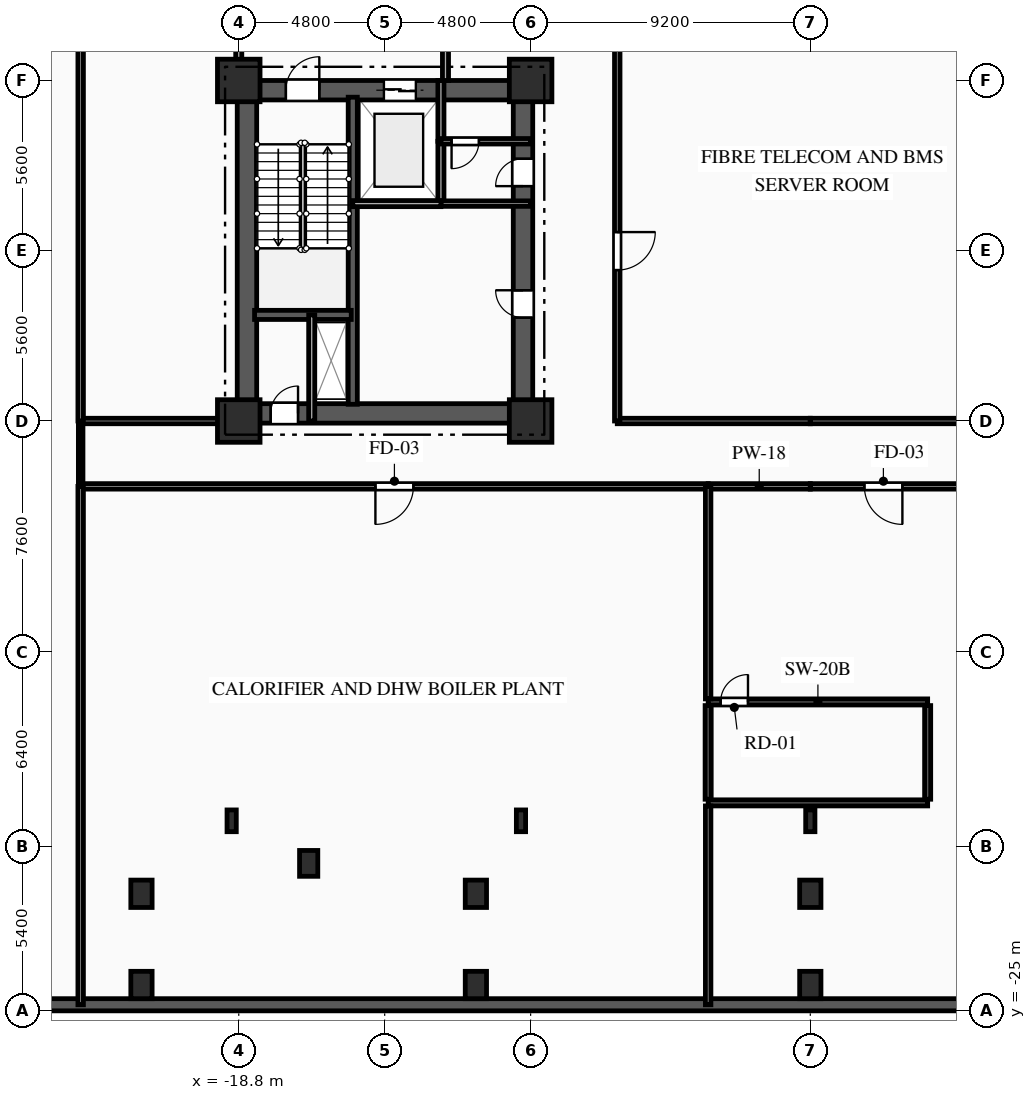
"""IFC4 building model, lengths in metres.
Left out: names, types, materials, properties, quantities, classifications, styles, units other than length and angle.
Written with IfcOpenShell. Run it as: python <this file> out.ifc"""

import sys

from ifc_helpers import new_model, si_unit, direction, frame, frame_2d, origin, origin_2d, place, context, subcontext, project, spatial, rectangle, i_section, extrude, element, fill, save


model = new_model("IFC4")
c1 = context("Model", 3, precision=1e-05, world=origin(), true_north=direction((0.0, 1.0)))
c2 = subcontext(c1, "Body", "Model", "MODEL_VIEW")
j1 = project(units=[si_unit("LENGTHUNIT", "METRE"), si_unit("PLANEANGLEUNIT", "RADIAN")], contexts=[c1])
p1 = place(None, origin())
s1 = spatial("IfcSite", under=j1, at=p1, CompositionType="ELEMENT")
p2 = place(p1, origin())
s2 = spatial("IfcBuilding", under=s1, at=p2, CompositionType="ELEMENT")
p3 = place(p2, frame((0.0, 0.0, -4.5)))
s3 = spatial("IfcBuildingStorey", under=s2, at=p3, CompositionType="ELEMENT", Elevation=-4.5)
for number, where, z_axis, x_axis in (
    (1, (-18.8, -5.6, 0.0), (0.0, 0.0, 1.0), (1.0, 0.0, 0.0)),
    (2, (-18.8, 5.6, 0.0), (0.0, 0.0, 1.0), (1.0, 0.0, 0.0)),
    (3, (-9.2, -5.6, 0.0), (0.0, 0.0, 1.0), (1.0, 0.0, 0.0)),
    (4, (-9.2, 5.6, 0.0), (0.0, 0.0, 1.0), (1.0, 0.0, 0.0)),
):
    element("IfcColumn", number, at=place(p3, frame(where, z_axis=z_axis, x_axis=x_axis)), inside=s3, PredefinedType="COLUMN", context=c2, shape_type="SweptSolid", body=[
        extrude(rectangle(XDim=1.4, YDim=1.4, at=origin_2d()), origin(), (0.0, 0.0, 1.0), 4.5),
    ])
for number, where, z_axis, x_axis in (
    (5, (-22.0, -21.15, 0.0), (0.0, 0.0, 1.0), (1.0, 0.0, 0.0)),
    (6, (-11.0, -21.15, 0.0), (0.0, 0.0, 1.0), (1.0, 0.0, 0.0)),
    (7, (0.0, -21.15, 0.0), (0.0, 0.0, 1.0), (1.0, 0.0, 0.0)),
    (8, (-22.0, -24.15, 0.0), (0.0, 0.0, 1.0), (1.0, 0.0, 0.0)),
    (9, (-11.0, -24.15, 0.0), (0.0, 0.0, 1.0), (1.0, 0.0, 0.0)),
    (10, (0.0, -24.15, 0.0), (0.0, 0.0, 1.0), (1.0, 0.0, 0.0)),
):
    element("IfcColumn", number, at=place(p3, frame(where, z_axis=z_axis, x_axis=x_axis)), inside=s3, PredefinedType="COLUMN", context=c2, shape_type="SweptSolid", body=[
        extrude(rectangle(XDim=0.7, YDim=0.9, at=origin_2d()), origin(), (0.0, 0.0, 1.0), 4.5),
    ])
p4 = place(p3, frame((-16.5, -20.15, 0.0), z_axis=(0.0, 0.0, 1.0), x_axis=(1.0, 0.0, 0.0)))
e11 = element("IfcColumn", 11, at=p4, inside=s3, PredefinedType="PILASTER", context=c2, shape_type="SweptSolid", body=[
    extrude(rectangle(XDim=0.6, YDim=0.85, at=origin_2d()), origin(), (0.0, 0.0, 1.0), 4.5),
])
for number, where, z_axis, x_axis in (
    (12, (-19.033, -18.75, 0.0), (0.0, 0.0, 1.0), (1.0, 0.0, 0.0)),
    (13, (-9.517, -18.75, 0.0), (0.0, 0.0, 1.0), (1.0, 0.0, 0.0)),
    (14, (0.0, -18.75, 0.0), (0.0, 0.0, 1.0), (1.0, 0.0, 0.0)),
):
    element("IfcColumn", number, at=place(p3, frame(where, z_axis=z_axis, x_axis=x_axis)), inside=s3, PredefinedType="COLUMN", context=c2, shape_type="SweptSolid", body=[
        extrude(i_section(OverallWidth=0.304, OverallDepth=0.716, WebThickness=0.021, FlangeThickness=0.04, FilletRadius=0.027, at=origin_2d()), origin(), (0.0, 0.0, 1.0), 4.5),
    ])
p5 = place(p3, frame((38.3, -24.8, 0.0), z_axis=(0.0, 0.0, 1.0), x_axis=(-1.0, 0.0, 0.0)))
e15 = element("IfcWall", 15, at=p5, inside=s3, PredefinedType="SOLIDWALL", context=c2, shape_type="SweptSolid", body=[
    extrude(rectangle(XDim=76.6, YDim=0.4, at=frame_2d((38.3, 0.0))), origin(), (0.0, 0.0, 1.0), 4.16),
])
p6 = place(p3, frame((-18.8, 5.28, 0.0), z_axis=(0.0, 0.0, 1.0), x_axis=(1.0, 0.0, 0.0)))
e16 = element("IfcWall", 16, at=p6, inside=s3, PredefinedType="SHEAR", context=c2, shape_type="SweptSolid", body=[
    extrude(rectangle(XDim=9.6, YDim=0.64, at=frame_2d((4.8, 0.0))), origin(), (0.0, 0.0, 1.0), 4.16),
])
p7 = place(p6, frame((1.55, 0.0, 0.0)))
e17 = element("IfcOpeningElement", 17, at=p7, cuts=e16, PredefinedType="OPENING", context=c2, shape_type="SweptSolid", body=[
    extrude(rectangle(XDim=1.1, YDim=2.15, at=frame_2d((0.55, 1.075))), frame((0.0, 0.33, 0.0), z_axis=(0.0, -1.0, 0.0), x_axis=(1.0, 0.0, 0.0)), (0.0, 0.0, 1.0), 0.66),
])
p8 = place(p6, frame((4.775, 0.0, 0.0)))
e18 = element("IfcOpeningElement", 18, at=p8, cuts=e16, PredefinedType="OPENING", context=c2, shape_type="SweptSolid", body=[
    extrude(rectangle(XDim=1.05, YDim=2.1, at=frame_2d((0.525, 1.05))), frame((0.0, 0.33, 0.0), z_axis=(0.0, -1.0, 0.0), x_axis=(1.0, 0.0, 0.0)), (0.0, 0.0, 1.0), 0.66),
])
p9 = place(p3, frame((-18.8, -5.35, 0.0), z_axis=(0.0, 0.0, 1.0), x_axis=(1.0, 0.0, 0.0)))
e19 = element("IfcWall", 19, at=p9, inside=s3, PredefinedType="SHEAR", context=c2, shape_type="SweptSolid", body=[
    extrude(rectangle(XDim=9.6, YDim=0.64, at=frame_2d((4.8, 0.0))), origin(), (0.0, 0.0, 1.0), 4.16),
])
p10 = place(p9, frame((1.05, 0.0, 0.0)))
e20 = element("IfcOpeningElement", 20, at=p10, cuts=e19, PredefinedType="OPENING", context=c2, shape_type="SweptSolid", body=[
    extrude(rectangle(XDim=0.9, YDim=2.1, at=frame_2d((0.45, 1.05))), frame((0.0, 0.33, 0.0), z_axis=(0.0, -1.0, 0.0), x_axis=(1.0, 0.0, 0.0)), (0.0, 0.0, 1.0), 0.66),
])
p11 = place(p3, frame((-18.53, -5.05, 0.0), z_axis=(0.0, 0.0, 1.0), x_axis=(0.0, 1.0, 0.0)))
e21 = element("IfcWall", 21, at=p11, inside=s3, PredefinedType="SHEAR", context=c2, shape_type="SweptSolid", body=[
    extrude(rectangle(XDim=10.1, YDim=0.64, at=frame_2d((5.05, 0.0))), origin(), (0.0, 0.0, 1.0), 4.16),
])
p12 = place(p3, frame((-9.45, -5.05, 0.0), z_axis=(0.0, 0.0, 1.0), x_axis=(0.0, 1.0, 0.0)))
e22 = element("IfcWall", 22, at=p12, inside=s3, PredefinedType="SHEAR", context=c2, shape_type="SweptSolid", body=[
    extrude(rectangle(XDim=10.1, YDim=0.64, at=frame_2d((5.05, 0.0))), origin(), (0.0, 0.0, 1.0), 4.16),
])
p13 = place(p12, frame((7.175, 0.0, 0.0)))
e23 = element("IfcOpeningElement", 23, at=p13, cuts=e22, PredefinedType="OPENING", context=c2, shape_type="SweptSolid", body=[
    extrude(rectangle(XDim=0.9, YDim=2.1, at=frame_2d((0.45, 1.05))), frame((0.0, 0.33, 0.0), z_axis=(0.0, -1.0, 0.0), x_axis=(1.0, 0.0, 0.0)), (0.0, 0.0, 1.0), 0.66),
])
p14 = place(p12, frame((2.85, 0.0, 0.0)))
e24 = element("IfcOpeningElement", 24, at=p14, cuts=e22, PredefinedType="OPENING", context=c2, shape_type="SweptSolid", body=[
    extrude(rectangle(XDim=0.9, YDim=2.1, at=frame_2d((0.45, 1.05))), frame((0.0, 0.33, 0.0), z_axis=(0.0, -1.0, 0.0), x_axis=(1.0, 0.0, 0.0)), (0.0, 0.0, 1.0), 0.66),
])
p15 = place(p3, frame((-15.05, -5.05, 0.0), z_axis=(0.0, 0.0, 1.0), x_axis=(0.0, 1.0, 0.0)))
e25 = element("IfcWall", 25, at=p15, inside=s3, PredefinedType="SHEAR", context=c2, shape_type="SweptSolid", body=[
    extrude(rectangle(XDim=10.1, YDim=0.3, at=frame_2d((5.05, 0.0))), origin(), (0.0, 0.0, 1.0), 4.16),
])
p16 = place(p3, frame((-18.28, -2.11, 0.0), z_axis=(0.0, 0.0, 1.0), x_axis=(1.0, 0.0, 0.0)))
e26 = element("IfcWall", 26, at=p16, inside=s3, PredefinedType="SHEAR", context=c2, shape_type="SweptSolid", body=[
    extrude(rectangle(XDim=3.18, YDim=0.3, at=frame_2d((1.59, 0.0))), origin(), (0.0, 0.0, 1.0), 4.16),
])
p17 = place(p3, frame((-3.36, -14.84, 0.0), z_axis=(0.0, 0.0, 1.0), x_axis=(1.0, 0.0, 0.0)))
e27 = element("IfcWall", 27, at=p17, inside=s3, PredefinedType="SHEAR", context=c2, shape_type="SweptSolid", body=[
    extrude(rectangle(XDim=7.22, YDim=0.2, at=frame_2d((3.61, 0.0))), origin(), (0.0, 0.0, 1.0), 4.16),
])
p18 = place(p17, frame((0.41, 0.0, 0.0)))
e28 = element("IfcOpeningElement", 28, at=p18, cuts=e27, PredefinedType="OPENING", context=c2, shape_type="SweptSolid", body=[
    extrude(rectangle(XDim=0.9, YDim=2.1, at=frame_2d((0.45, 1.05))), frame((0.0, 0.11, 0.0), z_axis=(0.0, -1.0, 0.0), x_axis=(1.0, 0.0, 0.0)), (0.0, 0.0, 1.0), 0.22),
])
p19 = place(p3, frame((-3.36, -18.16, 0.0), z_axis=(0.0, 0.0, 1.0), x_axis=(1.0, 0.0, 0.0)))
e29 = element("IfcWall", 29, at=p19, inside=s3, PredefinedType="SHEAR", context=c2, shape_type="SweptSolid", body=[
    extrude(rectangle(XDim=7.22, YDim=0.2, at=frame_2d((3.61, 0.0))), origin(), (0.0, 0.0, 1.0), 4.16),
])
for number, where, z_axis, x_axis in (
    (30, (-3.36, -18.04, 0.0), (0.0, 0.0, 1.0), (0.0, 1.0, 0.0)),
    (31, (3.86, -18.04, 0.0), (0.0, 0.0, 1.0), (0.0, 1.0, 0.0)),
):
    element("IfcWall", number, at=place(p3, frame(where, z_axis=z_axis, x_axis=x_axis)), inside=s3, PredefinedType="SHEAR", context=c2, shape_type="SweptSolid", body=[
        extrude(rectangle(XDim=3.08, YDim=0.2, at=frame_2d((1.54, 0.0))), origin(), (0.0, 0.0, 1.0), 4.16),
    ])
p20 = place(p3, frame((-16.4, -5.6, 0.0), z_axis=(0.0, 0.0, 1.0), x_axis=(0.0, 1.0, 0.0)))
e32 = element("IfcWall", 32, at=p20, inside=s3, PredefinedType="PARTITIONING", context=c2, shape_type="SweptSolid", body=[
    extrude(rectangle(XDim=3.49, YDim=0.2, at=frame_2d((1.745, 0.0))), origin(), (0.0, 0.0, 1.0), 4.16),
])
p21 = place(p3, frame((-12.15, 1.55, 0.0), z_axis=(0.0, 0.0, 1.0), x_axis=(0.0, 1.0, 0.0)))
e33 = element("IfcWall", 33, at=p21, inside=s3, PredefinedType="PARTITIONING", context=c2, shape_type="SweptSolid", body=[
    extrude(rectangle(XDim=2.05, YDim=0.2, at=frame_2d((1.025, 0.0))), origin(), (0.0, 0.0, 1.0), 4.16),
])
p22 = place(p3, frame((-12.15, 3.6, 0.0), z_axis=(0.0, 0.0, 1.0), x_axis=(0.0, 1.0, 0.0)))
e34 = element("IfcWall", 34, at=p22, inside=s3, PredefinedType="PARTITIONING", context=c2, shape_type="SweptSolid", body=[
    extrude(rectangle(XDim=2.0, YDim=0.2, at=frame_2d((1.0, 0.0))), origin(), (0.0, 0.0, 1.0), 4.16),
])
p23 = place(p3, frame((-12.0, 5.6, 0.0), z_axis=(0.0, 0.0, 1.0), x_axis=(0.0, 1.0, 0.0)))
e35 = element("IfcWall", 35, at=p23, inside=s3, PredefinedType="PARTITIONING", context=c2, shape_type="SweptSolid", body=[
    extrude(rectangle(XDim=2.9, YDim=0.2, at=frame_2d((1.45, 0.0))), origin(), (0.0, 0.0, 1.0), 4.16),
])
p24 = place(p3, frame((-18.8, 8.5, 0.0), z_axis=(0.0, 0.0, 1.0), x_axis=(0.0, -1.0, 0.0)))
e36 = element("IfcWall", 36, at=p24, inside=s3, PredefinedType="PARTITIONING", context=c2, shape_type="SweptSolid", body=[
    extrude(rectangle(XDim=2.9, YDim=0.2, at=frame_2d((1.45, 0.0))), origin(), (0.0, 0.0, 1.0), 3.645),
])
p25 = place(p3, frame((-9.2, 3.6, 0.0), z_axis=(0.0, 0.0, 1.0), x_axis=(-1.0, 0.0, 0.0)))
e37 = element("IfcWall", 37, at=p25, inside=s3, PredefinedType="PARTITIONING", context=c2, shape_type="SweptSolid", body=[
    extrude(rectangle(XDim=2.95, YDim=0.18, at=frame_2d((1.475, 0.0))), origin(), (0.0, 0.0, 1.0), 4.16),
])
p26 = place(p25, frame((1.7, 0.0, 0.0)))
e38 = element("IfcOpeningElement", 38, at=p26, cuts=e37, PredefinedType="OPENING", context=c2, shape_type="SweptSolid", body=[
    extrude(rectangle(XDim=0.9, YDim=2.1, at=frame_2d((0.45, 1.05))), frame((0.0, 0.1, 0.0), z_axis=(0.0, -1.0, 0.0), x_axis=(1.0, 0.0, 0.0)), (0.0, 0.0, 1.0), 0.2),
])
p27 = place(p3, frame((-12.15, 1.55, 0.0), z_axis=(0.0, 0.0, 1.0), x_axis=(1.0, 0.0, 0.0)))
e39 = element("IfcWall", 39, at=p27, inside=s3, PredefinedType="PARTITIONING", context=c2, shape_type="SweptSolid", body=[
    extrude(rectangle(XDim=2.95, YDim=0.18, at=frame_2d((1.475, 0.0))), origin(), (0.0, 0.0, 1.0), 4.16),
])
p28 = place(p3, frame((-24.0, -7.75, 0.0), z_axis=(0.0, 0.0, 1.0), x_axis=(0.0, 1.0, 0.0)))
e40 = element("IfcWall", 40, at=p28, inside=s3, PredefinedType="PARTITIONING", context=c2, shape_type="SweptSolid", body=[
    extrude(rectangle(XDim=2.15, YDim=0.15, at=frame_2d((1.075, 0.0))), origin(), (0.0, 0.0, 1.0), 4.16),
])
p29 = place(p3, frame((-3.36, -7.75, 0.0), z_axis=(0.0, 0.0, 1.0), x_axis=(-1.0, 0.0, 0.0)))
e41 = element("IfcWall", 41, at=p29, inside=s3, PredefinedType="PARTITIONING", context=c2, shape_type="SweptSolid", body=[
    extrude(rectangle(XDim=20.64, YDim=0.18, at=frame_2d((10.32, 0.0))), origin(), (0.0, 0.0, 1.0), 4.16),
])
p30 = place(p29, frame((9.695, 0.0, 0.0)))
e42 = element("IfcOpeningElement", 42, at=p30, cuts=e41, PredefinedType="OPENING", context=c2, shape_type="SweptSolid", body=[
    extrude(rectangle(XDim=1.25, YDim=2.2, at=frame_2d((0.625, 1.1))), frame((0.0, 0.1, 0.0), z_axis=(0.0, -1.0, 0.0), x_axis=(1.0, 0.0, 0.0)), (0.0, 0.0, 1.0), 0.2),
])
p31 = place(p3, frame((0.0, -7.75, 0.0), z_axis=(0.0, 0.0, 1.0), x_axis=(-1.0, 0.0, 0.0)))
e43 = element("IfcWall", 43, at=p31, inside=s3, PredefinedType="PARTITIONING", context=c2, shape_type="SweptSolid", body=[
    extrude(rectangle(XDim=3.36, YDim=0.18, at=frame_2d((1.68, 0.0))), origin(), (0.0, 0.0, 1.0), 4.16),
])
p32 = place(p3, frame((-24.0, -5.6, 0.0), z_axis=(0.0, 0.0, 1.0), x_axis=(1.0, 0.0, 0.0)))
e44 = element("IfcWall", 44, at=p32, inside=s3, PredefinedType="PARTITIONING", context=c2, shape_type="SweptSolid", body=[
    extrude(rectangle(XDim=5.2, YDim=0.18, at=frame_2d((2.6, 0.0))), origin(), (0.0, 0.0, 1.0), 4.16),
])
p33 = place(p3, frame((-6.35, -5.6, 0.0), z_axis=(0.0, 0.0, 1.0), x_axis=(1.0, 0.0, 0.0)))
e45 = element("IfcWall", 45, at=p33, inside=s3, PredefinedType="PARTITIONING", context=c2, shape_type="SweptSolid", body=[
    extrude(rectangle(XDim=6.35, YDim=0.18, at=frame_2d((3.175, 0.0))), origin(), (0.0, 0.0, 1.0), 3.331),
])
p34 = place(p3, frame((12.0, -7.75, 0.0), z_axis=(0.0, 0.0, 1.0), x_axis=(-1.0, 0.0, 0.0)))
e46 = element("IfcWall", 46, at=p34, inside=s3, PredefinedType="PARTITIONING", context=c2, shape_type="SweptSolid", body=[
    extrude(rectangle(XDim=12.0, YDim=0.18, at=frame_2d((6.0, 0.0))), origin(), (0.0, 0.0, 1.0), 4.16),
])
p35 = place(p34, frame((8.971, 0.0, 0.0)))
e47 = element("IfcOpeningElement", 47, at=p35, cuts=e46, PredefinedType="OPENING", context=c2, shape_type="SweptSolid", body=[
    extrude(rectangle(XDim=1.25, YDim=2.2, at=frame_2d((0.625, 1.1))), frame((0.0, 0.1, 0.0), z_axis=(0.0, -1.0, 0.0), x_axis=(1.0, 0.0, 0.0)), (0.0, 0.0, 1.0), 0.2),
])
p36 = place(p3, frame((0.0, -5.6, 0.0), z_axis=(0.0, 0.0, 1.0), x_axis=(1.0, 0.0, 0.0)))
e48 = element("IfcWall", 48, at=p36, inside=s3, PredefinedType="PARTITIONING", context=c2, shape_type="SweptSolid", body=[
    extrude(rectangle(XDim=6.35, YDim=0.18, at=frame_2d((3.175, 0.0))), origin(), (0.0, 0.0, 1.0), 3.331),
])
p37 = place(p3, frame((-6.35, 8.5, 0.0), z_axis=(0.0, 0.0, 1.0), x_axis=(0.0, -1.0, 0.0)))
e49 = element("IfcWall", 49, at=p37, inside=s3, PredefinedType="PARTITIONING", context=c2, shape_type="SweptSolid", body=[
    extrude(rectangle(XDim=14.1, YDim=0.18, at=frame_2d((7.05, 0.0))), origin(), (0.0, 0.0, 1.0), 4.16),
])
p38 = place(p37, frame((7.886, 0.0, 0.0)))
e50 = element("IfcOpeningElement", 50, at=p38, cuts=e49, PredefinedType="OPENING", context=c2, shape_type="SweptSolid", body=[
    extrude(rectangle(XDim=1.25, YDim=2.2, at=frame_2d((0.625, 1.1))), frame((0.0, 0.1, 0.0), z_axis=(0.0, -1.0, 0.0), x_axis=(1.0, 0.0, 0.0)), (0.0, 0.0, 1.0), 0.2),
])
p39 = place(p3, frame((-24.0, -7.75, 0.0), z_axis=(0.0, 0.0, 1.0), x_axis=(0.0, -1.0, 0.0)))
e51 = element("IfcWall", 51, at=p39, inside=s3, PredefinedType="PARTITIONING", context=c2, shape_type="SweptSolid", body=[
    extrude(rectangle(XDim=17.05, YDim=0.18, at=frame_2d((8.525, 0.0))), origin(), (0.0, 0.0, 1.0), 4.16),
])
p40 = place(p3, frame((-24.0, 8.5, 0.0), z_axis=(0.0, 0.0, 1.0), x_axis=(0.0, -1.0, 0.0)))
e52 = element("IfcWall", 52, at=p40, inside=s3, PredefinedType="PARTITIONING", context=c2, shape_type="SweptSolid", body=[
    extrude(rectangle(XDim=14.1, YDim=0.18, at=frame_2d((7.05, 0.0))), origin(), (0.0, 0.0, 1.0), 4.16),
])
p41 = place(p3, frame((-3.36, -7.75, 0.0), z_axis=(0.0, 0.0, 1.0), x_axis=(0.0, -1.0, 0.0)))
e53 = element("IfcWall", 53, at=p41, inside=s3, PredefinedType="PARTITIONING", context=c2, shape_type="SweptSolid", body=[
    extrude(rectangle(XDim=6.99, YDim=0.18, at=frame_2d((3.495, 0.0))), origin(), (0.0, 0.0, 1.0), 4.16),
])
p42 = place(p3, frame((-3.36, -18.26, 0.0), z_axis=(0.0, 0.0, 1.0), x_axis=(0.0, -1.0, 0.0)))
e54 = element("IfcWall", 54, at=p42, inside=s3, PredefinedType="PARTITIONING", context=c2, shape_type="SweptSolid", body=[
    extrude(rectangle(XDim=6.54, YDim=0.18, at=frame_2d((3.27, 0.0))), origin(), (0.0, 0.0, 1.0), 4.16),
])
p43 = place(p3, frame((-15.05, 1.55, 0.0), z_axis=(0.0, 0.0, 1.0), x_axis=(1.0, 0.0, 0.0)))
e55 = element("IfcWall", 55, at=p43, inside=s3, PredefinedType="PARTITIONING", context=c2, shape_type="SweptSolid", body=[
    extrude(rectangle(XDim=2.9, YDim=0.2, at=frame_2d((1.45, 0.0))), origin(), (0.0, 0.0, 1.0), 4.16),
])
p44 = place(p7, origin())
e56 = element("IfcDoor", 56, at=p44, inside=s3, OperationType="SINGLE_SWING_RIGHT", PredefinedType="DOOR", context=c2, shape_type="SweptSolid", body=[
    extrude(rectangle(XDim=1.1, YDim=2.15, at=frame_2d((0.55, 1.075))), frame((0.0, 0.025, 0.0), z_axis=(0.0, -1.0, 0.0), x_axis=(1.0, 0.0, 0.0)), (0.0, 0.0, 1.0), 0.05),
])
fill(e17, e56)
p45 = place(p8, origin())
e57 = element("IfcDoor", 57, at=p45, inside=s3, OperationType="DOUBLE_DOOR_SLIDING", PredefinedType="DOOR", context=c2, shape_type="SweptSolid", body=[
    extrude(rectangle(XDim=1.05, YDim=2.1, at=frame_2d((0.525, 1.05))), frame((0.0, 0.025, 0.0), z_axis=(0.0, -1.0, 0.0), x_axis=(1.0, 0.0, 0.0)), (0.0, 0.0, 1.0), 0.05),
])
fill(e18, e57)
p46 = place(p10, origin())
e58 = element("IfcDoor", 58, at=p46, inside=s3, OperationType="SINGLE_SWING_RIGHT", PredefinedType="DOOR", context=c2, shape_type="SweptSolid", body=[
    extrude(rectangle(XDim=0.9, YDim=2.1, at=frame_2d((0.45, 1.05))), frame((0.0, 0.025, 0.0), z_axis=(0.0, -1.0, 0.0), x_axis=(1.0, 0.0, 0.0)), (0.0, 0.0, 1.0), 0.05),
])
fill(e20, e58)
p47 = place(p18, origin())
e59 = element("IfcDoor", 59, at=p47, inside=s3, OperationType="SINGLE_SWING_RIGHT", PredefinedType="DOOR", context=c2, shape_type="SweptSolid", body=[
    extrude(rectangle(XDim=0.9, YDim=2.1, at=frame_2d((0.45, 1.05))), frame((0.0, 0.025, 0.0), z_axis=(0.0, -1.0, 0.0), x_axis=(1.0, 0.0, 0.0)), (0.0, 0.0, 1.0), 0.05),
])
fill(e28, e59)
p48 = place(p26, origin())
e60 = element("IfcDoor", 60, at=p48, inside=s3, OperationType="SINGLE_SWING_RIGHT", PredefinedType="DOOR", context=c2, shape_type="SweptSolid", body=[
    extrude(rectangle(XDim=0.9, YDim=2.1, at=frame_2d((0.45, 1.05))), frame((0.0, 0.025, 0.0), z_axis=(0.0, -1.0, 0.0), x_axis=(1.0, 0.0, 0.0)), (0.0, 0.0, 1.0), 0.05),
])
fill(e38, e60)
p49 = place(p13, origin())
e61 = element("IfcDoor", 61, at=p49, inside=s3, OperationType="SINGLE_SWING_LEFT", PredefinedType="DOOR", context=c2, shape_type="SweptSolid", body=[
    extrude(rectangle(XDim=0.9, YDim=2.1, at=frame_2d((0.45, 1.05))), frame((0.0, 0.025, 0.0), z_axis=(0.0, -1.0, 0.0), x_axis=(1.0, 0.0, 0.0)), (0.0, 0.0, 1.0), 0.05),
])
fill(e23, e61)
p50 = place(p14, origin())
e62 = element("IfcDoor", 62, at=p50, inside=s3, OperationType="SINGLE_SWING_RIGHT", PredefinedType="DOOR", context=c2, shape_type="SweptSolid", body=[
    extrude(rectangle(XDim=0.9, YDim=2.1, at=frame_2d((0.45, 1.05))), frame((0.0, 0.025, 0.0), z_axis=(0.0, -1.0, 0.0), x_axis=(1.0, 0.0, 0.0)), (0.0, 0.0, 1.0), 0.05),
])
fill(e24, e62)
p51 = place(p30, origin())
e63 = element("IfcDoor", 63, at=p51, inside=s3, OperationType="SINGLE_SWING_RIGHT", PredefinedType="DOOR", context=c2, shape_type="SweptSolid", body=[
    extrude(rectangle(XDim=1.25, YDim=2.2, at=frame_2d((0.625, 1.1))), frame((0.0, 0.025, 0.0), z_axis=(0.0, -1.0, 0.0), x_axis=(1.0, 0.0, 0.0)), (0.0, 0.0, 1.0), 0.05),
])
fill(e42, e63)
p52 = place(p35, origin())
e64 = element("IfcDoor", 64, at=p52, inside=s3, OperationType="SINGLE_SWING_LEFT", PredefinedType="DOOR", context=c2, shape_type="SweptSolid", body=[
    extrude(rectangle(XDim=1.25, YDim=2.2, at=frame_2d((0.625, 1.1))), frame((0.0, 0.025, 0.0), z_axis=(0.0, -1.0, 0.0), x_axis=(1.0, 0.0, 0.0)), (0.0, 0.0, 1.0), 0.05),
])
fill(e47, e64)
p53 = place(p38, origin())
e65 = element("IfcDoor", 65, at=p53, inside=s3, OperationType="SINGLE_SWING_LEFT", PredefinedType="DOOR", context=c2, shape_type="SweptSolid", body=[
    extrude(rectangle(XDim=1.25, YDim=2.2, at=frame_2d((0.625, 1.1))), frame((0.0, 0.025, 0.0), z_axis=(0.0, -1.0, 0.0), x_axis=(1.0, 0.0, 0.0)), (0.0, 0.0, 1.0), 0.05),
])
fill(e50, e65)
save(model, sys.argv[1])
